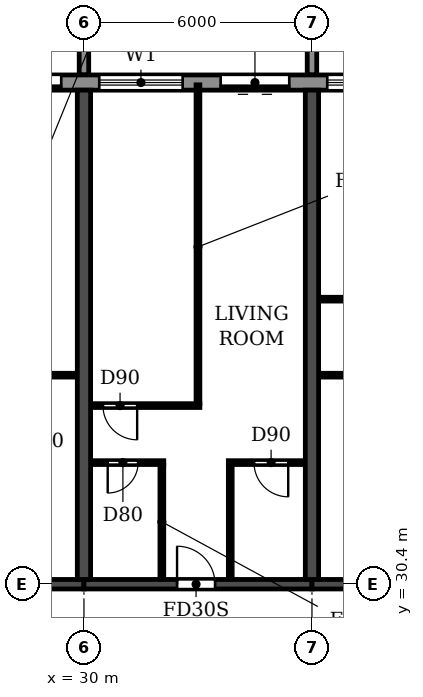
"""IFC4 building model, lengths in metres.
Left out: names, types, materials, properties, quantities, classifications, styles, units other than length and angle.
Written with IfcOpenShell. Run it as: python <this file> out.ifc"""

import sys

from ifc_helpers import new_model, si_unit, direction, frame, frame_2d, origin, place, context, subcontext, project, spatial, polyline, rectangle, outline, extrude, source, transform, mapped, element, fill, save


model = new_model("IFC4")
c1 = context("Model", 3, precision=1e-05, world=origin(), true_north=direction((0.0, 1.0)))
c2 = subcontext(c1, "Body", "Model", "MODEL_VIEW")
j1 = project(units=[si_unit("LENGTHUNIT", "METRE"), si_unit("PLANEANGLEUNIT", "RADIAN")], contexts=[c1])
p1 = place(None, origin())
s1 = spatial("IfcSite", under=j1, at=p1, CompositionType="ELEMENT")
p2 = place(p1, origin())
s2 = spatial("IfcBuilding", under=s1, at=p2, CompositionType="ELEMENT")
p3 = place(p2, frame((0.0, 0.0, 76.2)))
s3 = spatial("IfcBuildingStorey", under=s2, at=p3, CompositionType="ELEMENT", Elevation=76.2)
for number, where, z_axis, x_axis in (
    (1, (30.0, 30.525, 0.0), (0.0, 0.0, 1.0), (0.0, 1.0, 0.0)),
    (2, (36.0, 30.525, 0.0), (0.0, 0.0, 1.0), (0.0, 1.0, 0.0)),
):
    element("IfcWall", number, at=place(p3, frame(where, z_axis=z_axis, x_axis=x_axis)), inside=s3, PredefinedType="SHEAR", context=c2, shape_type="SweptSolid", body=[
        extrude(rectangle(XDim=12.875, YDim=0.35, at=frame_2d((6.438, 0.0))), origin(), (0.0, 0.0, 1.0), 3.06),
    ])
p4 = place(p3, frame((24.0, 30.4, 0.0), z_axis=(0.0, 0.0, 1.0), x_axis=(1.0, 0.0, 0.0)))
e3 = element("IfcWall", 3, at=p4, inside=s3, PredefinedType="SHEAR", context=c2, shape_type="SweptSolid", body=[
    extrude(rectangle(XDim=6.0, YDim=0.25, at=frame_2d((3.0, 0.0))), origin(), (0.0, 0.0, 1.0), 2.46),
])
p5 = place(p4, frame((2.55, 0.0, 0.0)))
e4 = element("IfcOpeningElement", 4, at=p5, cuts=e3, PredefinedType="OPENING", context=c2, shape_type="SweptSolid", body=[
    extrude(rectangle(XDim=1.0, YDim=2.1, at=frame_2d((0.5, 1.05))), frame((0.0, 0.135, 0.0), z_axis=(0.0, -1.0, 0.0), x_axis=(1.0, 0.0, 0.0)), (0.0, 0.0, 1.0), 0.27),
])
p6 = place(p3, frame((30.0, 30.4, 0.0), z_axis=(0.0, 0.0, 1.0), x_axis=(1.0, 0.0, 0.0)))
e5 = element("IfcWall", 5, at=p6, inside=s3, PredefinedType="SHEAR", context=c2, shape_type="SweptSolid", body=[
    extrude(rectangle(XDim=6.0, YDim=0.25, at=frame_2d((3.0, 0.0))), origin(), (0.0, 0.0, 1.0), 2.46),
])
p7 = place(p6, frame((2.45, 0.0, 0.0)))
e6 = element("IfcOpeningElement", 6, at=p7, cuts=e5, PredefinedType="OPENING", context=c2, shape_type="SweptSolid", body=[
    extrude(rectangle(XDim=1.0, YDim=2.1, at=frame_2d((0.5, 1.05))), frame((0.0, 0.135, 0.0), z_axis=(0.0, -1.0, 0.0), x_axis=(1.0, 0.0, 0.0)), (0.0, 0.0, 1.0), 0.27),
])
p8 = place(p3, frame((36.0, 30.4, 0.0), z_axis=(0.0, 0.0, 1.0), x_axis=(1.0, 0.0, 0.0)))
e7 = element("IfcWall", 7, at=p8, inside=s3, PredefinedType="SHEAR", context=c2, shape_type="SweptSolid", body=[
    extrude(rectangle(XDim=6.0, YDim=0.25, at=frame_2d((3.0, 0.0))), origin(), (0.0, 0.0, 1.0), 2.46),
])
p9 = place(p3, frame((91.317, 43.6, 0.0), z_axis=(0.0, 0.0, 1.0), x_axis=(-1.0, 0.0, 0.0)))
e8 = element("IfcWall", 8, at=p9, inside=s3, PredefinedType="STANDARD", context=c2, shape_type="SweptSolid", body=[
    extrude(rectangle(XDim=80.634, YDim=0.4, at=frame_2d((40.317, 0.0))), origin(), (0.0, 0.0, 1.0), 3.06),
])
p10 = place(p9, frame((76.717, 0.0, 0.9)))
e9 = element("IfcOpeningElement", 9, at=p10, cuts=e8, PredefinedType="OPENING", context=c2, shape_type="SweptSolid", body=[
    extrude(rectangle(XDim=2.2, YDim=1.5, at=frame_2d((1.1, 0.75))), frame((0.0, 0.21, 0.0), z_axis=(0.0, -1.0, 0.0), x_axis=(1.0, 0.0, 0.0)), (0.0, 0.0, 1.0), 0.42),
])
p11 = place(p9, frame((73.917, 0.0, 0.0)))
e10 = element("IfcOpeningElement", 10, at=p11, cuts=e8, PredefinedType="OPENING", context=c2, shape_type="SweptSolid", body=[
    extrude(rectangle(XDim=1.8, YDim=2.4, at=frame_2d((0.9, 1.2))), frame((0.0, 0.21, 0.0), z_axis=(0.0, -1.0, 0.0), x_axis=(1.0, 0.0, 0.0)), (0.0, 0.0, 1.0), 0.42),
])
p12 = place(p9, frame((70.917, 0.0, 0.0)))
e11 = element("IfcOpeningElement", 11, at=p12, cuts=e8, PredefinedType="OPENING", context=c2, shape_type="SweptSolid", body=[
    extrude(rectangle(XDim=1.8, YDim=2.4, at=frame_2d((0.9, 1.2))), frame((0.0, 0.21, 0.0), z_axis=(0.0, -1.0, 0.0), x_axis=(1.0, 0.0, 0.0)), (0.0, 0.0, 1.0), 0.42),
])
p13 = place(p9, frame((67.717, 0.0, 0.9)))
e12 = element("IfcOpeningElement", 12, at=p13, cuts=e8, PredefinedType="OPENING", context=c2, shape_type="SweptSolid", body=[
    extrude(rectangle(XDim=2.2, YDim=1.5, at=frame_2d((1.1, 0.75))), frame((0.0, 0.21, 0.0), z_axis=(0.0, -1.0, 0.0), x_axis=(1.0, 0.0, 0.0)), (0.0, 0.0, 1.0), 0.42),
])
p14 = place(p9, frame((64.717, 0.0, 0.9)))
e13 = element("IfcOpeningElement", 13, at=p14, cuts=e8, PredefinedType="OPENING", context=c2, shape_type="SweptSolid", body=[
    extrude(rectangle(XDim=2.2, YDim=1.5, at=frame_2d((1.1, 0.75))), frame((0.0, 0.21, 0.0), z_axis=(0.0, -1.0, 0.0), x_axis=(1.0, 0.0, 0.0)), (0.0, 0.0, 1.0), 0.42),
])
p15 = place(p9, frame((61.917, 0.0, 0.0)))
e14 = element("IfcOpeningElement", 14, at=p15, cuts=e8, PredefinedType="OPENING", context=c2, shape_type="SweptSolid", body=[
    extrude(rectangle(XDim=1.8, YDim=2.4, at=frame_2d((0.9, 1.2))), frame((0.0, 0.21, 0.0), z_axis=(0.0, -1.0, 0.0), x_axis=(1.0, 0.0, 0.0)), (0.0, 0.0, 1.0), 0.42),
])
p16 = place(p9, frame((58.717, 0.0, 0.9)))
e15 = element("IfcOpeningElement", 15, at=p16, cuts=e8, PredefinedType="OPENING", context=c2, shape_type="SweptSolid", body=[
    extrude(rectangle(XDim=2.2, YDim=1.5, at=frame_2d((1.1, 0.75))), frame((0.0, 0.21, 0.0), z_axis=(0.0, -1.0, 0.0), x_axis=(1.0, 0.0, 0.0)), (0.0, 0.0, 1.0), 0.42),
])
p17 = place(p9, frame((55.917, 0.0, 0.0)))
e16 = element("IfcOpeningElement", 16, at=p17, cuts=e8, PredefinedType="OPENING", context=c2, shape_type="SweptSolid", body=[
    extrude(rectangle(XDim=1.8, YDim=2.4, at=frame_2d((0.9, 1.2))), frame((0.0, 0.21, 0.0), z_axis=(0.0, -1.0, 0.0), x_axis=(1.0, 0.0, 0.0)), (0.0, 0.0, 1.0), 0.42),
])
p18 = place(p9, frame((52.717, 0.0, 0.9)))
e17 = element("IfcOpeningElement", 17, at=p18, cuts=e8, PredefinedType="OPENING", context=c2, shape_type="SweptSolid", body=[
    extrude(rectangle(XDim=2.2, YDim=1.5, at=frame_2d((1.1, 0.75))), frame((0.0, 0.21, 0.0), z_axis=(0.0, -1.0, 0.0), x_axis=(1.0, 0.0, 0.0)), (0.0, 0.0, 1.0), 0.42),
])
p19 = place(p9, frame((49.717, 0.0, 0.9)))
e18 = element("IfcOpeningElement", 18, at=p19, cuts=e8, PredefinedType="OPENING", context=c2, shape_type="SweptSolid", body=[
    extrude(rectangle(XDim=2.2, YDim=1.5, at=frame_2d((1.1, 0.75))), frame((0.0, 0.21, 0.0), z_axis=(0.0, -1.0, 0.0), x_axis=(1.0, 0.0, 0.0)), (0.0, 0.0, 1.0), 0.42),
])
p20 = place(p9, frame((46.917, 0.0, 0.0)))
e19 = element("IfcOpeningElement", 19, at=p20, cuts=e8, PredefinedType="OPENING", context=c2, shape_type="SweptSolid", body=[
    extrude(rectangle(XDim=1.8, YDim=2.4, at=frame_2d((0.9, 1.2))), frame((0.0, 0.21, 0.0), z_axis=(0.0, -1.0, 0.0), x_axis=(1.0, 0.0, 0.0)), (0.0, 0.0, 1.0), 0.42),
])
p21 = place(p9, frame((43.717, 0.0, 0.9)))
e20 = element("IfcOpeningElement", 20, at=p21, cuts=e8, PredefinedType="OPENING", context=c2, shape_type="SweptSolid", body=[
    extrude(rectangle(XDim=2.2, YDim=1.5, at=frame_2d((1.1, 0.75))), frame((0.0, 0.21, 0.0), z_axis=(0.0, -1.0, 0.0), x_axis=(1.0, 0.0, 0.0)), (0.0, 0.0, 1.0), 0.42),
])
p22 = place(p9, frame((40.717, 0.0, 0.9)))
e21 = element("IfcOpeningElement", 21, at=p22, cuts=e8, PredefinedType="OPENING", context=c2, shape_type="SweptSolid", body=[
    extrude(rectangle(XDim=2.2, YDim=1.5, at=frame_2d((1.1, 0.75))), frame((0.0, 0.21, 0.0), z_axis=(0.0, -1.0, 0.0), x_axis=(1.0, 0.0, 0.0)), (0.0, 0.0, 1.0), 0.42),
])
p23 = place(p9, frame((37.917, 0.0, 0.0)))
e22 = element("IfcOpeningElement", 22, at=p23, cuts=e8, PredefinedType="OPENING", context=c2, shape_type="SweptSolid", body=[
    extrude(rectangle(XDim=1.8, YDim=2.4, at=frame_2d((0.9, 1.2))), frame((0.0, 0.21, 0.0), z_axis=(0.0, -1.0, 0.0), x_axis=(1.0, 0.0, 0.0)), (0.0, 0.0, 1.0), 0.42),
])
p24 = place(p9, frame((34.717, 0.0, 0.9)))
e23 = element("IfcOpeningElement", 23, at=p24, cuts=e8, PredefinedType="OPENING", context=c2, shape_type="SweptSolid", body=[
    extrude(rectangle(XDim=2.2, YDim=1.5, at=frame_2d((1.1, 0.75))), frame((0.0, 0.21, 0.0), z_axis=(0.0, -1.0, 0.0), x_axis=(1.0, 0.0, 0.0)), (0.0, 0.0, 1.0), 0.42),
])
p25 = place(p9, frame((31.917, 0.0, 0.0)))
e24 = element("IfcOpeningElement", 24, at=p25, cuts=e8, PredefinedType="OPENING", context=c2, shape_type="SweptSolid", body=[
    extrude(rectangle(XDim=1.8, YDim=2.4, at=frame_2d((0.9, 1.2))), frame((0.0, 0.21, 0.0), z_axis=(0.0, -1.0, 0.0), x_axis=(1.0, 0.0, 0.0)), (0.0, 0.0, 1.0), 0.42),
])
p26 = place(p9, frame((28.717, 0.0, 0.9)))
e25 = element("IfcOpeningElement", 25, at=p26, cuts=e8, PredefinedType="OPENING", context=c2, shape_type="SweptSolid", body=[
    extrude(rectangle(XDim=2.2, YDim=1.5, at=frame_2d((1.1, 0.75))), frame((0.0, 0.21, 0.0), z_axis=(0.0, -1.0, 0.0), x_axis=(1.0, 0.0, 0.0)), (0.0, 0.0, 1.0), 0.42),
])
p27 = place(p9, frame((25.717, 0.0, 0.9)))
e26 = element("IfcOpeningElement", 26, at=p27, cuts=e8, PredefinedType="OPENING", context=c2, shape_type="SweptSolid", body=[
    extrude(rectangle(XDim=2.2, YDim=1.5, at=frame_2d((1.1, 0.75))), frame((0.0, 0.21, 0.0), z_axis=(0.0, -1.0, 0.0), x_axis=(1.0, 0.0, 0.0)), (0.0, 0.0, 1.0), 0.42),
])
p28 = place(p9, frame((22.717, 0.0, 0.9)))
e27 = element("IfcOpeningElement", 27, at=p28, cuts=e8, PredefinedType="OPENING", context=c2, shape_type="SweptSolid", body=[
    extrude(rectangle(XDim=2.2, YDim=1.5, at=frame_2d((1.1, 0.75))), frame((0.0, 0.21, 0.0), z_axis=(0.0, -1.0, 0.0), x_axis=(1.0, 0.0, 0.0)), (0.0, 0.0, 1.0), 0.42),
])
p29 = place(p9, frame((19.917, 0.0, 0.0)))
e28 = element("IfcOpeningElement", 28, at=p29, cuts=e8, PredefinedType="OPENING", context=c2, shape_type="SweptSolid", body=[
    extrude(rectangle(XDim=1.8, YDim=2.4, at=frame_2d((0.9, 1.2))), frame((0.0, 0.21, 0.0), z_axis=(0.0, -1.0, 0.0), x_axis=(1.0, 0.0, 0.0)), (0.0, 0.0, 1.0), 0.42),
])
p30 = place(p9, frame((16.717, 0.0, 0.9)))
e29 = element("IfcOpeningElement", 29, at=p30, cuts=e8, PredefinedType="OPENING", context=c2, shape_type="SweptSolid", body=[
    extrude(rectangle(XDim=2.2, YDim=1.5, at=frame_2d((1.1, 0.75))), frame((0.0, 0.21, 0.0), z_axis=(0.0, -1.0, 0.0), x_axis=(1.0, 0.0, 0.0)), (0.0, 0.0, 1.0), 0.42),
])
p31 = place(p9, frame((13.717, 0.0, 0.9)))
e30 = element("IfcOpeningElement", 30, at=p31, cuts=e8, PredefinedType="OPENING", context=c2, shape_type="SweptSolid", body=[
    extrude(rectangle(XDim=2.2, YDim=1.5, at=frame_2d((1.1, 0.75))), frame((0.0, 0.21, 0.0), z_axis=(0.0, -1.0, 0.0), x_axis=(1.0, 0.0, 0.0)), (0.0, 0.0, 1.0), 0.42),
])
p32 = place(p9, frame((10.717, 0.0, 0.9)))
e31 = element("IfcOpeningElement", 31, at=p32, cuts=e8, PredefinedType="OPENING", context=c2, shape_type="SweptSolid", body=[
    extrude(rectangle(XDim=2.2, YDim=1.5, at=frame_2d((1.1, 0.75))), frame((0.0, 0.21, 0.0), z_axis=(0.0, -1.0, 0.0), x_axis=(1.0, 0.0, 0.0)), (0.0, 0.0, 1.0), 0.42),
])
p33 = place(p9, frame((7.917, 0.0, 0.0)))
e32 = element("IfcOpeningElement", 32, at=p33, cuts=e8, PredefinedType="OPENING", context=c2, shape_type="SweptSolid", body=[
    extrude(rectangle(XDim=1.8, YDim=2.4, at=frame_2d((0.9, 1.2))), frame((0.0, 0.21, 0.0), z_axis=(0.0, -1.0, 0.0), x_axis=(1.0, 0.0, 0.0)), (0.0, 0.0, 1.0), 0.42),
])
p34 = place(p9, frame((4.717, 0.0, 0.9)))
e33 = element("IfcOpeningElement", 33, at=p34, cuts=e8, PredefinedType="OPENING", context=c2, shape_type="SweptSolid", body=[
    extrude(rectangle(XDim=2.2, YDim=1.5, at=frame_2d((1.1, 0.75))), frame((0.0, 0.21, 0.0), z_axis=(0.0, -1.0, 0.0), x_axis=(1.0, 0.0, 0.0)), (0.0, 0.0, 1.0), 0.42),
])
p35 = place(p9, frame((1.917, 0.0, 0.0)))
e34 = element("IfcOpeningElement", 34, at=p35, cuts=e8, PredefinedType="OPENING", context=c2, shape_type="SweptSolid", body=[
    extrude(rectangle(XDim=1.8, YDim=2.4, at=frame_2d((0.9, 1.2))), frame((0.0, 0.21, 0.0), z_axis=(0.0, -1.0, 0.0), x_axis=(1.0, 0.0, 0.0)), (0.0, 0.0, 1.0), 0.42),
])
m1 = source(origin(), c2, "Body", "SweptSolid", [
    extrude(outline(polyline([(0.0, 0.0), (0.25, 0.0), (0.25, 3.1), (0.0, 3.1), (0.0, 0.0)])), origin(), (0.0, 0.0, 1.0), 3.1),
])
for number, where in (
    (35, (29.875, 43.8, 0.0)),
    (36, (35.875, 43.8, 0.0)),
):
    element("IfcWall", number, at=place(p3, frame(where)), inside=s3, PredefinedType="STANDARD", context=c2, shape_type="MappedRepresentation", body=[
        mapped(m1, transform((0.0, 0.0, 0.0))),
    ])
p36 = place(p3, frame((30.185, 33.6, 0.0), z_axis=(0.0, 0.0, 1.0), x_axis=(1.0, 0.0, 0.0)))
e37 = element("IfcWall", 37, at=p36, inside=s3, PredefinedType="PARTITIONING", context=c2, shape_type="SweptSolid", body=[
    extrude(rectangle(XDim=1.915, YDim=0.1, at=frame_2d((0.958, 0.0))), origin(), (0.0, 0.0, 1.0), 3.06),
])
p37 = place(p36, frame((0.44, 0.0, 0.0)))
e38 = element("IfcOpeningElement", 38, at=p37, cuts=e37, PredefinedType="OPENING", context=c2, shape_type="SweptSolid", body=[
    extrude(rectangle(XDim=0.8, YDim=2.1, at=frame_2d((0.4, 1.05))), frame((0.0, 0.06, 0.0), z_axis=(0.0, -1.0, 0.0), x_axis=(1.0, 0.0, 0.0)), (0.0, 0.0, 1.0), 0.12),
])
p38 = place(p3, frame((33.8, 33.6, 0.0), z_axis=(0.0, 0.0, 1.0), x_axis=(1.0, 0.0, 0.0)))
e39 = element("IfcWall", 39, at=p38, inside=s3, PredefinedType="PARTITIONING", context=c2, shape_type="SweptSolid", body=[
    extrude(rectangle(XDim=2.015, YDim=0.1, at=frame_2d((1.007, 0.0))), origin(), (0.0, 0.0, 1.0), 3.06),
])
p39 = place(p38, frame((0.675, 0.0, 0.0)))
e40 = element("IfcOpeningElement", 40, at=p39, cuts=e39, PredefinedType="OPENING", context=c2, shape_type="SweptSolid", body=[
    extrude(rectangle(XDim=0.9, YDim=2.1, at=frame_2d((0.45, 1.05))), frame((0.0, 0.06, 0.0), z_axis=(0.0, -1.0, 0.0), x_axis=(1.0, 0.0, 0.0)), (0.0, 0.0, 1.0), 0.12),
])
p40 = place(p3, frame((30.185, 35.1, 0.0), z_axis=(0.0, 0.0, 1.0), x_axis=(1.0, 0.0, 0.0)))
e41 = element("IfcWall", 41, at=p40, inside=s3, PredefinedType="PARTITIONING", context=c2, shape_type="SweptSolid", body=[
    extrude(rectangle(XDim=2.865, YDim=0.1, at=frame_2d((1.433, 0.0))), origin(), (0.0, 0.0, 1.0), 3.06),
])
p41 = place(p40, frame((0.315, 0.0, 0.0)))
e42 = element("IfcOpeningElement", 42, at=p41, cuts=e41, PredefinedType="OPENING", context=c2, shape_type="SweptSolid", body=[
    extrude(rectangle(XDim=0.9, YDim=2.1, at=frame_2d((0.45, 1.05))), frame((0.0, 0.06, 0.0), z_axis=(0.0, -1.0, 0.0), x_axis=(1.0, 0.0, 0.0)), (0.0, 0.0, 1.0), 0.12),
])
p42 = place(p3, frame((27.9, 35.9, 0.0), z_axis=(0.0, 0.0, 1.0), x_axis=(1.0, 0.0, 0.0)))
e43 = element("IfcWall", 43, at=p42, inside=s3, PredefinedType="PARTITIONING", context=c2, shape_type="SweptSolid", body=[
    extrude(rectangle(XDim=1.915, YDim=0.1, at=frame_2d((0.958, 0.0))), origin(), (0.0, 0.0, 1.0), 3.06),
])
p43 = place(p3, frame((36.185, 35.9, 0.0), z_axis=(0.0, 0.0, 1.0), x_axis=(1.0, 0.0, 0.0)))
e44 = element("IfcWall", 44, at=p43, inside=s3, PredefinedType="PARTITIONING", context=c2, shape_type="SweptSolid", body=[
    extrude(rectangle(XDim=3.165, YDim=0.1, at=frame_2d((1.583, 0.0))), origin(), (0.0, 0.0, 1.0), 3.06),
])
p44 = place(p43, frame((1.065, 0.0, 0.0)))
e45 = element("IfcOpeningElement", 45, at=p44, cuts=e44, PredefinedType="OPENING", context=c2, shape_type="SweptSolid", body=[
    extrude(rectangle(XDim=0.8, YDim=2.1, at=frame_2d((0.4, 1.05))), frame((0.0, 0.06, 0.0), z_axis=(0.0, -1.0, 0.0), x_axis=(1.0, 0.0, 0.0)), (0.0, 0.0, 1.0), 0.12),
])
p45 = place(p3, frame((36.185, 37.9, 0.0), z_axis=(0.0, 0.0, 1.0), x_axis=(1.0, 0.0, 0.0)))
e46 = element("IfcWall", 46, at=p45, inside=s3, PredefinedType="PARTITIONING", context=c2, shape_type="SweptSolid", body=[
    extrude(rectangle(XDim=5.63, YDim=0.1, at=frame_2d((2.815, 0.0))), origin(), (0.0, 0.0, 1.0), 3.06),
])
p46 = place(p45, frame((1.965, 0.0, 0.0)))
e47 = element("IfcOpeningElement", 47, at=p46, cuts=e46, PredefinedType="OPENING", context=c2, shape_type="SweptSolid", body=[
    extrude(rectangle(XDim=0.9, YDim=2.1, at=frame_2d((0.45, 1.05))), frame((0.0, 0.06, 0.0), z_axis=(0.0, -1.0, 0.0), x_axis=(1.0, 0.0, 0.0)), (0.0, 0.0, 1.0), 0.12),
])
p47 = place(p3, frame((32.05, 30.535, 0.0), z_axis=(0.0, 0.0, 1.0), x_axis=(0.0, 1.0, 0.0)))
e48 = element("IfcWall", 48, at=p47, inside=s3, PredefinedType="PARTITIONING", context=c2, shape_type="SweptSolid", body=[
    extrude(rectangle(XDim=3.015, YDim=0.1, at=frame_2d((1.508, 0.0))), origin(), (0.0, 0.0, 1.0), 3.06),
])
p48 = place(p3, frame((33.0, 35.15, 0.0), z_axis=(0.0, 0.0, 1.0), x_axis=(0.0, 1.0, 0.0)))
e49 = element("IfcWall", 49, at=p48, inside=s3, PredefinedType="PARTITIONING", context=c2, shape_type="SweptSolid", body=[
    extrude(rectangle(XDim=8.39, YDim=0.1, at=frame_2d((4.195, 0.0))), origin(), (0.0, 0.0, 1.0), 3.06),
])
p49 = place(p3, frame((33.85, 30.535, 0.0), z_axis=(0.0, 0.0, 1.0), x_axis=(0.0, 1.0, 0.0)))
e50 = element("IfcWall", 50, at=p49, inside=s3, PredefinedType="PARTITIONING", context=c2, shape_type="SweptSolid", body=[
    extrude(rectangle(XDim=3.015, YDim=0.1, at=frame_2d((1.508, 0.0))), origin(), (0.0, 0.0, 1.0), 3.06),
])
p50 = place(p15, origin())
e51 = element("IfcDoor", 51, at=p50, inside=s3, OperationType="DOUBLE_DOOR_SLIDING", PredefinedType="DOOR", context=c2, shape_type="SweptSolid", body=[
    extrude(rectangle(XDim=1.8, YDim=2.4, at=frame_2d((0.9, 1.2))), frame((0.0, 0.025, 0.0), z_axis=(0.0, -1.0, 0.0), x_axis=(1.0, 0.0, 0.0)), (0.0, 0.0, 1.0), 0.05),
])
fill(e14, e51)
p51 = place(p16, origin())
e52 = element("IfcWindow", 52, at=p51, inside=s3, PartitioningType="DOUBLE_PANEL_HORIZONTAL", PredefinedType="WINDOW", context=c2, shape_type="SweptSolid", body=[
    extrude(rectangle(XDim=2.2, YDim=1.5, at=frame_2d((1.1, 0.75))), frame((0.0, 0.03, 0.0), z_axis=(0.0, -1.0, 0.0), x_axis=(1.0, 0.0, 0.0)), (0.0, 0.0, 1.0), 0.06),
])
fill(e15, e52)
p52 = place(p17, origin())
e53 = element("IfcDoor", 53, at=p52, inside=s3, OperationType="DOUBLE_DOOR_SLIDING", PredefinedType="DOOR", context=c2, shape_type="SweptSolid", body=[
    extrude(rectangle(XDim=1.8, YDim=2.4, at=frame_2d((0.9, 1.2))), frame((0.0, 0.025, 0.0), z_axis=(0.0, -1.0, 0.0), x_axis=(1.0, 0.0, 0.0)), (0.0, 0.0, 1.0), 0.05),
])
fill(e16, e53)
p53 = place(p18, origin())
e54 = element("IfcWindow", 54, at=p53, inside=s3, PartitioningType="DOUBLE_PANEL_HORIZONTAL", PredefinedType="WINDOW", context=c2, shape_type="SweptSolid", body=[
    extrude(rectangle(XDim=2.2, YDim=1.5, at=frame_2d((1.1, 0.75))), frame((0.0, 0.03, 0.0), z_axis=(0.0, -1.0, 0.0), x_axis=(1.0, 0.0, 0.0)), (0.0, 0.0, 1.0), 0.06),
])
fill(e17, e54)
p54 = place(p41, frame((0.9, 0.0, 0.0), z_axis=(0.0, 0.0, 1.0), x_axis=(-1.0, 0.0, 0.0)))
e55 = element("IfcDoor", 55, at=p54, inside=s3, OperationType="SINGLE_SWING_LEFT", PredefinedType="DOOR", context=c2, shape_type="SweptSolid", body=[
    extrude(rectangle(XDim=0.9, YDim=2.1, at=frame_2d((0.45, 1.05))), frame((0.0, 0.025, 0.0), z_axis=(0.0, -1.0, 0.0), x_axis=(1.0, 0.0, 0.0)), (0.0, 0.0, 1.0), 0.05),
])
fill(e42, e55)
p55 = place(p37, frame((0.8, 0.0, 0.0), z_axis=(0.0, 0.0, 1.0), x_axis=(-1.0, 0.0, 0.0)))
e56 = element("IfcDoor", 56, at=p55, inside=s3, OperationType="SINGLE_SWING_RIGHT", PredefinedType="DOOR", context=c2, shape_type="SweptSolid", body=[
    extrude(rectangle(XDim=0.8, YDim=2.1, at=frame_2d((0.4, 1.05))), frame((0.0, 0.025, 0.0), z_axis=(0.0, -1.0, 0.0), x_axis=(1.0, 0.0, 0.0)), (0.0, 0.0, 1.0), 0.05),
])
fill(e38, e56)
p56 = place(p7, origin())
e57 = element("IfcDoor", 57, at=p56, inside=s3, OperationType="SINGLE_SWING_LEFT", PredefinedType="DOOR", context=c2, shape_type="SweptSolid", body=[
    extrude(rectangle(XDim=1.0, YDim=2.1, at=frame_2d((0.5, 1.05))), frame((0.0, 0.025, 0.0), z_axis=(0.0, -1.0, 0.0), x_axis=(1.0, 0.0, 0.0)), (0.0, 0.0, 1.0), 0.05),
])
fill(e6, e57)
p57 = place(p39, frame((0.9, 0.0, 0.0), z_axis=(0.0, 0.0, 1.0), x_axis=(-1.0, 0.0, 0.0)))
e58 = element("IfcDoor", 58, at=p57, inside=s3, OperationType="SINGLE_SWING_LEFT", PredefinedType="DOOR", context=c2, shape_type="SweptSolid", body=[
    extrude(rectangle(XDim=0.9, YDim=2.1, at=frame_2d((0.45, 1.05))), frame((0.0, 0.025, 0.0), z_axis=(0.0, -1.0, 0.0), x_axis=(1.0, 0.0, 0.0)), (0.0, 0.0, 1.0), 0.05),
])
fill(e40, e58)
save(model, sys.argv[1])
